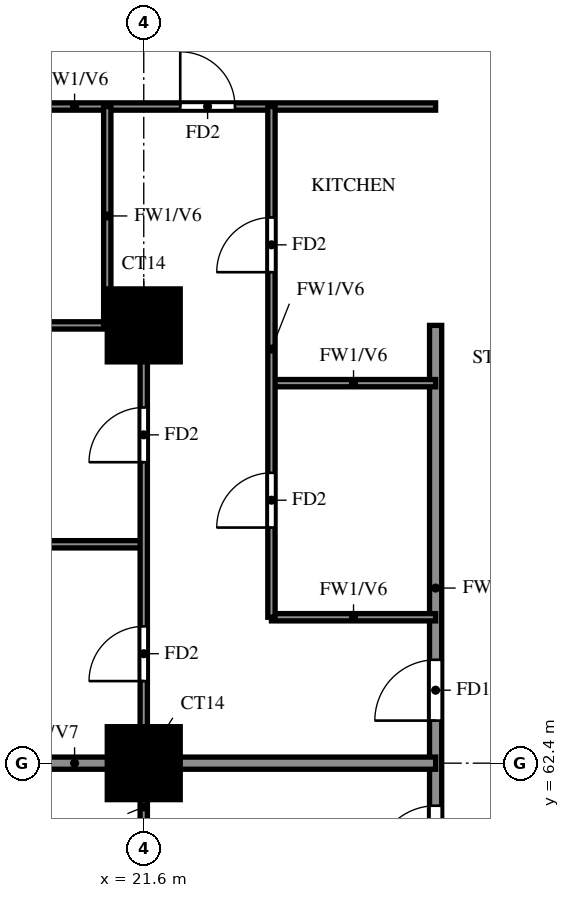
"""IFC4 building model, lengths in metres.
Left out: names, types, materials, properties, quantities, classifications, styles, units other than length and angle.
Written with IfcOpenShell. Run it as: python <this file> out.ifc"""

import sys

from ifc_helpers import new_model, si_unit, direction, frame, frame_2d, origin, origin_2d, place, context, subcontext, project, spatial, rectangle, extrude, source, transform, mapped, element, fill, save


model = new_model("IFC4")
c1 = context("Model", 3, precision=1e-05, world=origin(), true_north=direction((0.0, 1.0)))
c2 = subcontext(c1, "Body", "Model", "MODEL_VIEW")
j1 = project(units=[si_unit("LENGTHUNIT", "METRE"), si_unit("PLANEANGLEUNIT", "RADIAN")], contexts=[c1])
p1 = place(None, origin())
s1 = spatial("IfcSite", under=j1, at=p1, CompositionType="ELEMENT")
p2 = place(p1, origin())
s2 = spatial("IfcBuilding", under=s1, at=p2, CompositionType="ELEMENT")
p3 = place(p2, frame((0.0, 0.0, 104.0)))
s3 = spatial("IfcBuildingStorey", under=s2, at=p3, CompositionType="ELEMENT", Elevation=104.0)
m1 = source(origin(), c2, "Body", "SweptSolid", [
    extrude(rectangle(XDim=1.2, YDim=1.2, at=origin_2d()), origin(), (0.0, 0.0, 1.0), 3.1),
])
for number, where, z_axis, x_axis in (
    (1, (21.6, 62.4, 0.0), (0.0, 0.0, 1.0), (1.0, 0.0, 0.0)),
    (2, (21.6, 69.6, 0.0), (0.0, 0.0, 1.0), (1.0, 0.0, 0.0)),
):
    element("IfcColumn", number, at=place(p3, frame(where, z_axis=z_axis, x_axis=x_axis)), inside=s3, PredefinedType="COLUMN", context=c2, shape_type="MappedRepresentation", body=[
        mapped(m1, transform((0.0, 0.0, 0.0))),
    ])
p4 = place(p3, frame((26.4, 60.0, 0.0), z_axis=(0.0, 0.0, 1.0), x_axis=(0.0, 1.0, 0.0)))
e3 = element("IfcWall", 3, at=p4, inside=s3, PredefinedType="SOLIDWALL", context=c2, shape_type="SweptSolid", body=[
    extrude(rectangle(XDim=9.6, YDim=0.2, at=frame_2d((4.8, 0.0))), origin(), (0.0, 0.0, 1.0), 3.1),
])
p5 = place(p4, frame((0.7, 0.0, 0.0)))
e4 = element("IfcOpeningElement", 4, at=p5, cuts=e3, PredefinedType="OPENING", context=c2, shape_type="SweptSolid", body=[
    extrude(rectangle(XDim=1.0, YDim=2.1, at=frame_2d((0.5, 1.05))), frame((0.0, 0.11, 0.0), z_axis=(0.0, -1.0, 0.0), x_axis=(1.0, 0.0, 0.0)), (0.0, 0.0, 1.0), 0.22),
])
p6 = place(p4, frame((3.1, 0.0, 0.0)))
e5 = element("IfcOpeningElement", 5, at=p6, cuts=e3, PredefinedType="OPENING", context=c2, shape_type="SweptSolid", body=[
    extrude(rectangle(XDim=1.0, YDim=2.1, at=frame_2d((0.5, 1.05))), frame((0.0, 0.11, 0.0), z_axis=(0.0, -1.0, 0.0), x_axis=(1.0, 0.0, 0.0)), (0.0, 0.0, 1.0), 0.22),
])
p7 = place(p3, frame((14.525, 62.4, 0.0), z_axis=(0.0, 0.0, 1.0), x_axis=(1.0, 0.0, 0.0)))
e6 = element("IfcWall", 6, at=p7, inside=s3, PredefinedType="SOLIDWALL", context=c2, shape_type="SweptSolid", body=[
    extrude(rectangle(XDim=11.875, YDim=0.2, at=frame_2d((5.938, 0.0))), origin(), (0.0, 0.0, 1.0), 3.1),
])
p8 = place(p3, frame((23.7, 64.8, 0.0), z_axis=(0.0, 0.0, 1.0), x_axis=(1.0, 0.0, 0.0)))
e7 = element("IfcWall", 7, at=p8, inside=s3, PredefinedType="PARTITIONING", context=c2, shape_type="SweptSolid", body=[
    extrude(rectangle(XDim=2.7, YDim=0.12, at=frame_2d((1.35, 0.0))), origin(), (0.0, 0.0, 1.0), 3.1),
])
p9 = place(p3, frame((14.525, 66.0, 0.0), z_axis=(0.0, 0.0, 1.0), x_axis=(1.0, 0.0, 0.0)))
e8 = element("IfcWall", 8, at=p9, inside=s3, PredefinedType="PARTITIONING", context=c2, shape_type="SweptSolid", body=[
    extrude(rectangle(XDim=7.075, YDim=0.12, at=frame_2d((3.538, 0.0))), origin(), (0.0, 0.0, 1.0), 3.1),
])
p10 = place(p3, frame((23.7, 68.65, 0.0), z_axis=(0.0, 0.0, 1.0), x_axis=(1.0, 0.0, 0.0)))
e9 = element("IfcWall", 9, at=p10, inside=s3, PredefinedType="PARTITIONING", context=c2, shape_type="SweptSolid", body=[
    extrude(rectangle(XDim=2.7, YDim=0.12, at=frame_2d((1.35, 0.0))), origin(), (0.0, 0.0, 1.0), 3.1),
])
p11 = place(p3, frame((14.525, 69.6, 0.0), z_axis=(0.0, 0.0, 1.0), x_axis=(1.0, 0.0, 0.0)))
e10 = element("IfcWall", 10, at=p11, inside=s3, PredefinedType="PARTITIONING", context=c2, shape_type="SweptSolid", body=[
    extrude(rectangle(XDim=7.075, YDim=0.12, at=frame_2d((3.538, 0.0))), origin(), (0.0, 0.0, 1.0), 3.1),
])
p12 = place(p11, frame((2.837, 0.0, 0.0)))
e11 = element("IfcOpeningElement", 11, at=p12, cuts=e10, PredefinedType="OPENING", context=c2, shape_type="SweptSolid", body=[
    extrude(rectangle(XDim=0.8, YDim=2.1, at=frame_2d((0.4, 1.05))), frame((0.0, 0.07, 0.0), z_axis=(0.0, -1.0, 0.0), x_axis=(1.0, 0.0, 0.0)), (0.0, 0.0, 1.0), 0.14),
])
p13 = place(p3, frame((14.525, 73.2, 0.0), z_axis=(0.0, 0.0, 1.0), x_axis=(1.0, 0.0, 0.0)))
e12 = element("IfcWall", 12, at=p13, inside=s3, PredefinedType="PARTITIONING", context=c2, shape_type="SweptSolid", body=[
    extrude(rectangle(XDim=11.875, YDim=0.12, at=frame_2d((5.938, 0.0))), origin(), (0.0, 0.0, 1.0), 3.1),
])
p14 = place(p13, frame((7.675, 0.0, 0.0)))
e13 = element("IfcOpeningElement", 13, at=p14, cuts=e12, PredefinedType="OPENING", context=c2, shape_type="SweptSolid", body=[
    extrude(rectangle(XDim=0.9, YDim=2.1, at=frame_2d((0.45, 1.05))), frame((0.0, 0.07, 0.0), z_axis=(0.0, -1.0, 0.0), x_axis=(1.0, 0.0, 0.0)), (0.0, 0.0, 1.0), 0.14),
])
p15 = place(p3, frame((21.0, 69.6, 0.0), z_axis=(0.0, 0.0, 1.0), x_axis=(0.0, 1.0, 0.0)))
e14 = element("IfcWall", 14, at=p15, inside=s3, PredefinedType="PARTITIONING", context=c2, shape_type="SweptSolid", body=[
    extrude(rectangle(XDim=3.6, YDim=0.12, at=frame_2d((1.8, 0.0))), origin(), (0.0, 0.0, 1.0), 3.1),
])
p16 = place(p3, frame((21.6, 55.2, 0.0), z_axis=(0.0, 0.0, 1.0), x_axis=(0.0, 1.0, 0.0)))
e15 = element("IfcWall", 15, at=p16, inside=s3, PredefinedType="PARTITIONING", context=c2, shape_type="SweptSolid", body=[
    extrude(rectangle(XDim=14.4, YDim=0.12, at=frame_2d((7.2, 0.0))), origin(), (0.0, 0.0, 1.0), 3.1),
])
p17 = place(p16, frame((2.85, 0.0, 0.0)))
e16 = element("IfcOpeningElement", 16, at=p17, cuts=e15, PredefinedType="OPENING", context=c2, shape_type="SweptSolid", body=[
    extrude(rectangle(XDim=1.5, YDim=2.1, at=frame_2d((0.75, 1.05))), frame((0.0, 0.07, 0.0), z_axis=(0.0, -1.0, 0.0), x_axis=(1.0, 0.0, 0.0)), (0.0, 0.0, 1.0), 0.14),
])
p18 = place(p16, frame((8.55, 0.0, 0.0)))
e17 = element("IfcOpeningElement", 17, at=p18, cuts=e15, PredefinedType="OPENING", context=c2, shape_type="SweptSolid", body=[
    extrude(rectangle(XDim=0.9, YDim=2.1, at=frame_2d((0.45, 1.05))), frame((0.0, 0.07, 0.0), z_axis=(0.0, -1.0, 0.0), x_axis=(1.0, 0.0, 0.0)), (0.0, 0.0, 1.0), 0.14),
])
p19 = place(p16, frame((12.15, 0.0, 0.0)))
e18 = element("IfcOpeningElement", 18, at=p19, cuts=e15, PredefinedType="OPENING", context=c2, shape_type="SweptSolid", body=[
    extrude(rectangle(XDim=0.9, YDim=2.1, at=frame_2d((0.45, 1.05))), frame((0.0, 0.07, 0.0), z_axis=(0.0, -1.0, 0.0), x_axis=(1.0, 0.0, 0.0)), (0.0, 0.0, 1.0), 0.14),
])
p20 = place(p3, frame((23.7, 64.8, 0.0), z_axis=(0.0, 0.0, 1.0), x_axis=(0.0, 1.0, 0.0)))
e19 = element("IfcWall", 19, at=p20, inside=s3, PredefinedType="PARTITIONING", context=c2, shape_type="SweptSolid", body=[
    extrude(rectangle(XDim=8.4, YDim=0.12, at=frame_2d((4.2, 0.0))), origin(), (0.0, 0.0, 1.0), 3.1),
])
p21 = place(p20, frame((1.475, 0.0, 0.0)))
e20 = element("IfcOpeningElement", 20, at=p21, cuts=e19, PredefinedType="OPENING", context=c2, shape_type="SweptSolid", body=[
    extrude(rectangle(XDim=0.9, YDim=2.1, at=frame_2d((0.45, 1.05))), frame((0.0, 0.07, 0.0), z_axis=(0.0, -1.0, 0.0), x_axis=(1.0, 0.0, 0.0)), (0.0, 0.0, 1.0), 0.14),
])
p22 = place(p20, frame((5.675, 0.0, 0.0)))
e21 = element("IfcOpeningElement", 21, at=p22, cuts=e19, PredefinedType="OPENING", context=c2, shape_type="SweptSolid", body=[
    extrude(rectangle(XDim=0.9, YDim=2.1, at=frame_2d((0.45, 1.05))), frame((0.0, 0.07, 0.0), z_axis=(0.0, -1.0, 0.0), x_axis=(1.0, 0.0, 0.0)), (0.0, 0.0, 1.0), 0.14),
])
p23 = place(p5, origin())
e22 = element("IfcDoor", 22, at=p23, inside=s3, OperationType="SINGLE_SWING_LEFT", PredefinedType="DOOR", context=c2, shape_type="SweptSolid", body=[
    extrude(rectangle(XDim=1.0, YDim=2.1, at=frame_2d((0.5, 1.05))), frame((0.0, 0.025, 0.0), z_axis=(0.0, -1.0, 0.0), x_axis=(1.0, 0.0, 0.0)), (0.0, 0.0, 1.0), 0.05),
])
fill(e4, e22)
p24 = place(p6, origin())
e23 = element("IfcDoor", 23, at=p24, inside=s3, OperationType="SINGLE_SWING_RIGHT", PredefinedType="DOOR", context=c2, shape_type="SweptSolid", body=[
    extrude(rectangle(XDim=1.0, YDim=2.1, at=frame_2d((0.5, 1.05))), frame((0.0, 0.025, 0.0), z_axis=(0.0, -1.0, 0.0), x_axis=(1.0, 0.0, 0.0)), (0.0, 0.0, 1.0), 0.05),
])
fill(e5, e23)
p25 = place(p18, origin())
e24 = element("IfcDoor", 24, at=p25, inside=s3, OperationType="SINGLE_SWING_LEFT", PredefinedType="DOOR", context=c2, shape_type="SweptSolid", body=[
    extrude(rectangle(XDim=0.9, YDim=2.1, at=frame_2d((0.45, 1.05))), frame((0.0, 0.025, 0.0), z_axis=(0.0, -1.0, 0.0), x_axis=(1.0, 0.0, 0.0)), (0.0, 0.0, 1.0), 0.05),
])
fill(e17, e24)
p26 = place(p19, origin())
e25 = element("IfcDoor", 25, at=p26, inside=s3, OperationType="SINGLE_SWING_LEFT", PredefinedType="DOOR", context=c2, shape_type="SweptSolid", body=[
    extrude(rectangle(XDim=0.9, YDim=2.1, at=frame_2d((0.45, 1.05))), frame((0.0, 0.025, 0.0), z_axis=(0.0, -1.0, 0.0), x_axis=(1.0, 0.0, 0.0)), (0.0, 0.0, 1.0), 0.05),
])
fill(e18, e25)
p27 = place(p14, origin())
e26 = element("IfcDoor", 26, at=p27, inside=s3, OperationType="SINGLE_SWING_LEFT", PredefinedType="DOOR", context=c2, shape_type="SweptSolid", body=[
    extrude(rectangle(XDim=0.9, YDim=2.1, at=frame_2d((0.45, 1.05))), frame((0.0, 0.025, 0.0), z_axis=(0.0, -1.0, 0.0), x_axis=(1.0, 0.0, 0.0)), (0.0, 0.0, 1.0), 0.05),
])
fill(e13, e26)
p28 = place(p21, origin())
e27 = element("IfcDoor", 27, at=p28, inside=s3, OperationType="SINGLE_SWING_LEFT", PredefinedType="DOOR", context=c2, shape_type="SweptSolid", body=[
    extrude(rectangle(XDim=0.9, YDim=2.1, at=frame_2d((0.45, 1.05))), frame((0.0, 0.025, 0.0), z_axis=(0.0, -1.0, 0.0), x_axis=(1.0, 0.0, 0.0)), (0.0, 0.0, 1.0), 0.05),
])
fill(e20, e27)
p29 = place(p22, origin())
e28 = element("IfcDoor", 28, at=p29, inside=s3, OperationType="SINGLE_SWING_RIGHT", PredefinedType="DOOR", context=c2, shape_type="SweptSolid", body=[
    extrude(rectangle(XDim=0.9, YDim=2.1, at=frame_2d((0.45, 1.05))), frame((0.0, 0.025, 0.0), z_axis=(0.0, -1.0, 0.0), x_axis=(1.0, 0.0, 0.0)), (0.0, 0.0, 1.0), 0.05),
])
fill(e21, e28)
save(model, sys.argv[1])
